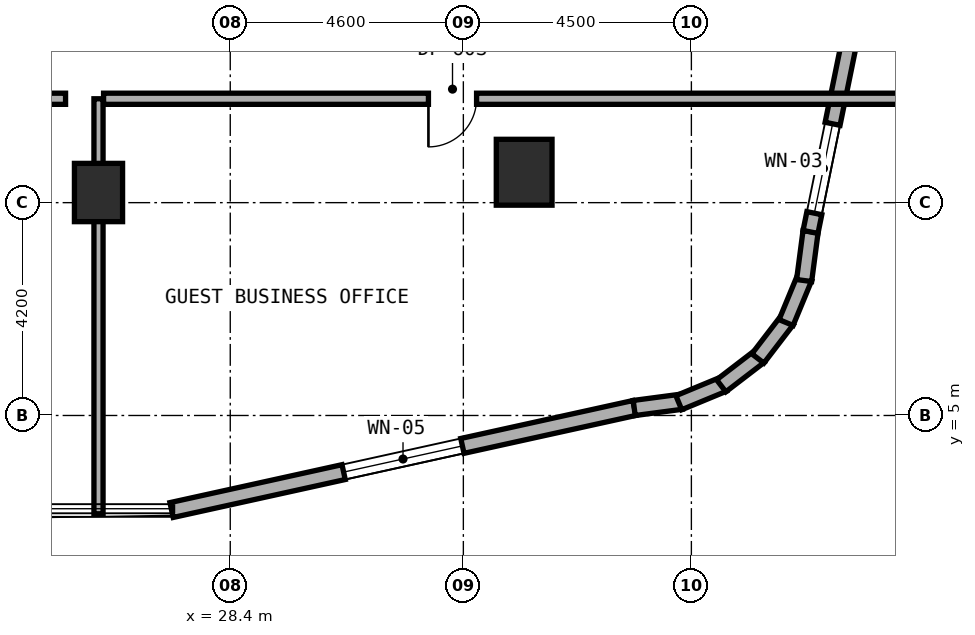
"""IFC4 building model, lengths in metres.
Left out: names, types, materials, properties, quantities, classifications, styles, units other than length and angle.
Written with IfcOpenShell. Run it as: python <this file> out.ifc"""

import sys

from ifc_helpers import new_model, si_unit, direction, frame, frame_2d, origin, origin_2d, place, context, subcontext, project, spatial, rectangle, extrude, element, fill, save


model = new_model("IFC4")
c1 = context("Model", 3, precision=1e-05, world=origin(), true_north=direction((0.0, 1.0)))
c2 = subcontext(c1, "Body", "Model", "MODEL_VIEW")
j1 = project(units=[si_unit("LENGTHUNIT", "METRE"), si_unit("PLANEANGLEUNIT", "RADIAN")], contexts=[c1])
p1 = place(None, origin())
s1 = spatial("IfcSite", under=j1, at=p1, CompositionType="ELEMENT")
p2 = place(p1, origin())
s2 = spatial("IfcBuilding", under=s1, at=p2, CompositionType="ELEMENT")
p3 = place(p2, frame((0.0, 0.0, 52.0)))
s3 = spatial("IfcBuildingStorey", under=s2, at=p3, CompositionType="ELEMENT", Elevation=52.0)
p4 = place(p3, frame((25.8, 9.4, 0.0), z_axis=(0.0, 0.0, 1.0), x_axis=(1.0, 0.0, 0.0)))
e1 = element("IfcColumn", 1, at=p4, inside=s3, PredefinedType="COLUMN", context=c2, shape_type="SweptSolid", body=[
    extrude(rectangle(XDim=0.95, YDim=1.15, at=origin_2d()), origin(), (0.0, 0.0, 1.0), 3.5),
])
p5 = place(p3, frame((34.2, 9.8, 0.0), z_axis=(0.0, 0.0, 1.0), x_axis=(1.0, 0.0, 0.0)))
e2 = element("IfcColumn", 2, at=p5, inside=s3, PredefinedType="COLUMN", context=c2, shape_type="SweptSolid", body=[
    extrude(rectangle(XDim=1.1, YDim=1.3, at=origin_2d()), origin(), (0.0, 0.0, 1.0), 3.5),
])
p6 = place(p3, frame((27.242, 3.134, 0.0), z_axis=(0.0, 0.0, 1.0), x_axis=(0.97654500432, 0.215313386808, 0.0)))
e3 = element("IfcWall", 3, at=p6, inside=s3, PredefinedType="STANDARD", context=c2, shape_type="SweptSolid", body=[
    extrude(rectangle(XDim=9.354, YDim=0.3, at=frame_2d((4.677, 0.0))), origin(), (0.0, 0.0, 1.0), 3.22),
])
p7 = place(p6, frame((3.477, 0.0, 0.8)))
e4 = element("IfcOpeningElement", 4, at=p7, cuts=e3, PredefinedType="OPENING", context=c2, shape_type="SweptSolid", body=[
    extrude(rectangle(XDim=2.4, YDim=1.6, at=frame_2d((1.2, 0.8))), frame((0.0, 0.16, 0.0), z_axis=(0.0, -1.0, 0.0), x_axis=(1.0, 0.0, 0.0)), (0.0, 0.0, 1.0), 0.32),
])
p8 = place(p3, frame((36.372, 5.148, 0.0), z_axis=(0.0, 0.0, 1.0), x_axis=(0.991359246108, 0.131174864804, 0.0)))
e5 = element("IfcWall", 5, at=p8, inside=s3, PredefinedType="STANDARD", context=c2, shape_type="SweptSolid", body=[
    extrude(rectangle(XDim=0.938, YDim=0.3, at=frame_2d((0.469, 0.0))), origin(), (0.0, 0.0, 1.0), 3.22),
])
p9 = place(p3, frame((37.252, 5.252, 0.0), z_axis=(0.0, 0.0, 1.0), x_axis=(0.924019948111, 0.382344263057, 0.0)))
e6 = element("IfcWall", 6, at=p9, inside=s3, PredefinedType="STANDARD", context=c2, shape_type="SweptSolid", body=[
    extrude(rectangle(XDim=0.955, YDim=0.3, at=frame_2d((0.477, 0.0))), origin(), (0.0, 0.0, 1.0), 3.22),
])
p10 = place(p3, frame((38.089, 5.586, 0.0), z_axis=(0.0, 0.0, 1.0), x_axis=(0.793573440799, 0.608474481025, 0.0)))
e7 = element("IfcWall", 7, at=p10, inside=s3, PredefinedType="STANDARD", context=c2, shape_type="SweptSolid", body=[
    extrude(rectangle(XDim=0.955, YDim=0.3, at=frame_2d((0.478, 0.0))), origin(), (0.0, 0.0, 1.0), 3.22),
])
p11 = place(p3, frame((38.812, 6.125, 0.0), z_axis=(0.0, 0.0, 1.0), x_axis=(0.608351047625, 0.793668068435, 0.0)))
e8 = element("IfcWall", 8, at=p11, inside=s3, PredefinedType="STANDARD", context=c2, shape_type="SweptSolid", body=[
    extrude(rectangle(XDim=0.955, YDim=0.3, at=frame_2d((0.478, 0.0))), origin(), (0.0, 0.0, 1.0), 3.22),
])
p12 = place(p3, frame((39.369, 6.834, 0.0), z_axis=(0.0, 0.0, 1.0), x_axis=(0.382344263057, 0.924019948111, 0.0)))
e9 = element("IfcWall", 9, at=p12, inside=s3, PredefinedType="STANDARD", context=c2, shape_type="SweptSolid", body=[
    extrude(rectangle(XDim=0.955, YDim=0.3, at=frame_2d((0.477, 0.0))), origin(), (0.0, 0.0, 1.0), 3.22),
])
p13 = place(p3, frame((39.725, 7.663, 0.0), z_axis=(0.0, 0.0, 1.0), x_axis=(0.130454512571, 0.991454295543, 0.0)))
e10 = element("IfcWall", 10, at=p13, inside=s3, PredefinedType="STANDARD", context=c2, shape_type="SweptSolid", body=[
    extrude(rectangle(XDim=0.973, YDim=0.3, at=frame_2d((0.487, 0.0))), origin(), (0.0, 0.0, 1.0), 3.22),
])
p14 = place(p3, frame((39.851, 8.622, 0.0), z_axis=(0.0, 0.0, 1.0), x_axis=(0.199990901713, 0.979797754249, 0.0)))
e11 = element("IfcWall", 11, at=p14, inside=s3, PredefinedType="STANDARD", context=c2, shape_type="SweptSolid", body=[
    extrude(rectangle(XDim=10.065, YDim=0.3, at=frame_2d((5.033, 0.0))), origin(), (0.0, 0.0, 1.0), 3.22),
])
p15 = place(p14, frame((0.378, 0.0, 0.85)))
e12 = element("IfcOpeningElement", 12, at=p15, cuts=e11, PredefinedType="OPENING", context=c2, shape_type="SweptSolid", body=[
    extrude(rectangle(XDim=1.8, YDim=1.5, at=frame_2d((0.9, 0.75))), frame((0.0, 0.16, 0.0), z_axis=(0.0, -1.0, 0.0), x_axis=(1.0, 0.0, 0.0)), (0.0, 0.0, 1.0), 0.32),
])
p16 = place(p14, frame((5.236, 0.0, 0.8)))
e13 = element("IfcOpeningElement", 13, at=p16, cuts=e11, PredefinedType="OPENING", context=c2, shape_type="SweptSolid", body=[
    extrude(rectangle(XDim=2.4, YDim=1.6, at=frame_2d((1.2, 0.8))), frame((0.0, 0.16, 0.0), z_axis=(0.0, -1.0, 0.0), x_axis=(1.0, 0.0, 0.0)), (0.0, 0.0, 1.0), 0.32),
])
p17 = place(p3, frame((21.45, 11.25, 0.0), z_axis=(0.0, 0.0, 1.0), x_axis=(1.0, 0.0, 0.0)))
e14 = element("IfcWall", 14, at=p17, inside=s3, PredefinedType="SOLIDWALL", context=c2, shape_type="SweptSolid", body=[
    extrude(rectangle(XDim=3.7, YDim=0.22, at=frame_2d((1.85, 0.0))), origin(), (0.0, 0.0, 1.0), 2.745),
])
p18 = place(p17, frame((1.16, 0.0, 0.0)))
e15 = element("IfcOpeningElement", 15, at=p18, cuts=e14, PredefinedType="OPENING", context=c2, shape_type="SweptSolid", body=[
    extrude(rectangle(XDim=1.1, YDim=2.1, at=frame_2d((0.55, 1.05))), frame((0.0, 0.12, 0.0), z_axis=(0.0, -1.0, 0.0), x_axis=(1.0, 0.0, 0.0)), (0.0, 0.0, 1.0), 0.24),
])
p19 = place(p3, frame((25.8, 3.06, 0.0), z_axis=(0.0, 0.0, 1.0), x_axis=(0.0, 1.0, 0.0)))
e16 = element("IfcWall", 16, at=p19, inside=s3, PredefinedType="SOLIDWALL", context=c2, shape_type="SweptSolid", body=[
    extrude(rectangle(XDim=8.19, YDim=0.18, at=frame_2d((4.095, 0.0))), origin(), (0.0, 0.0, 1.0), 2.395),
])
p20 = place(p3, frame((25.9, 11.25, 0.0), z_axis=(0.0, 0.0, 1.0), x_axis=(1.0, 0.0, 0.0)))
e17 = element("IfcWall", 17, at=p20, inside=s3, PredefinedType="SOLIDWALL", context=c2, shape_type="SweptSolid", body=[
    extrude(rectangle(XDim=15.84, YDim=0.22, at=frame_2d((7.92, 0.0))), origin(), (0.0, 0.0, 1.0), 2.395),
])
p21 = place(p20, frame((6.411, 0.0, 0.0)))
e18 = element("IfcOpeningElement", 18, at=p21, cuts=e17, PredefinedType="OPENING", context=c2, shape_type="SweptSolid", body=[
    extrude(rectangle(XDim=0.95, YDim=2.1, at=frame_2d((0.475, 1.05))), frame((0.0, 0.12, 0.0), z_axis=(0.0, -1.0, 0.0), x_axis=(1.0, 0.0, 0.0)), (0.0, 0.0, 1.0), 0.24),
])
p22 = place(p7, origin())
e19 = element("IfcWindow", 19, at=p22, inside=s3, PartitioningType="SINGLE_PANEL", PredefinedType="WINDOW", context=c2, shape_type="SweptSolid", body=[
    extrude(rectangle(XDim=2.4, YDim=1.6, at=frame_2d((1.2, 0.8))), frame((0.0, 0.03, 0.0), z_axis=(0.0, -1.0, 0.0), x_axis=(1.0, 0.0, 0.0)), (0.0, 0.0, 1.0), 0.06),
])
fill(e4, e19)
p23 = place(p15, origin())
e20 = element("IfcWindow", 20, at=p23, inside=s3, PartitioningType="SINGLE_PANEL", PredefinedType="WINDOW", context=c2, shape_type="SweptSolid", body=[
    extrude(rectangle(XDim=1.8, YDim=1.5, at=frame_2d((0.9, 0.75))), frame((0.0, 0.03, 0.0), z_axis=(0.0, -1.0, 0.0), x_axis=(1.0, 0.0, 0.0)), (0.0, 0.0, 1.0), 0.06),
])
fill(e12, e20)
p24 = place(p21, frame((0.95, 0.0, 0.0), z_axis=(0.0, 0.0, 1.0), x_axis=(-1.0, 0.0, 0.0)))
e21 = element("IfcDoor", 21, at=p24, inside=s3, OperationType="SINGLE_SWING_RIGHT", PredefinedType="DOOR", context=c2, shape_type="SweptSolid", body=[
    extrude(rectangle(XDim=0.95, YDim=2.1, at=frame_2d((0.475, 1.05))), frame((0.0, 0.025, 0.0), z_axis=(0.0, -1.0, 0.0), x_axis=(1.0, 0.0, 0.0)), (0.0, 0.0, 1.0), 0.05),
])
fill(e18, e21)
save(model, sys.argv[1])
